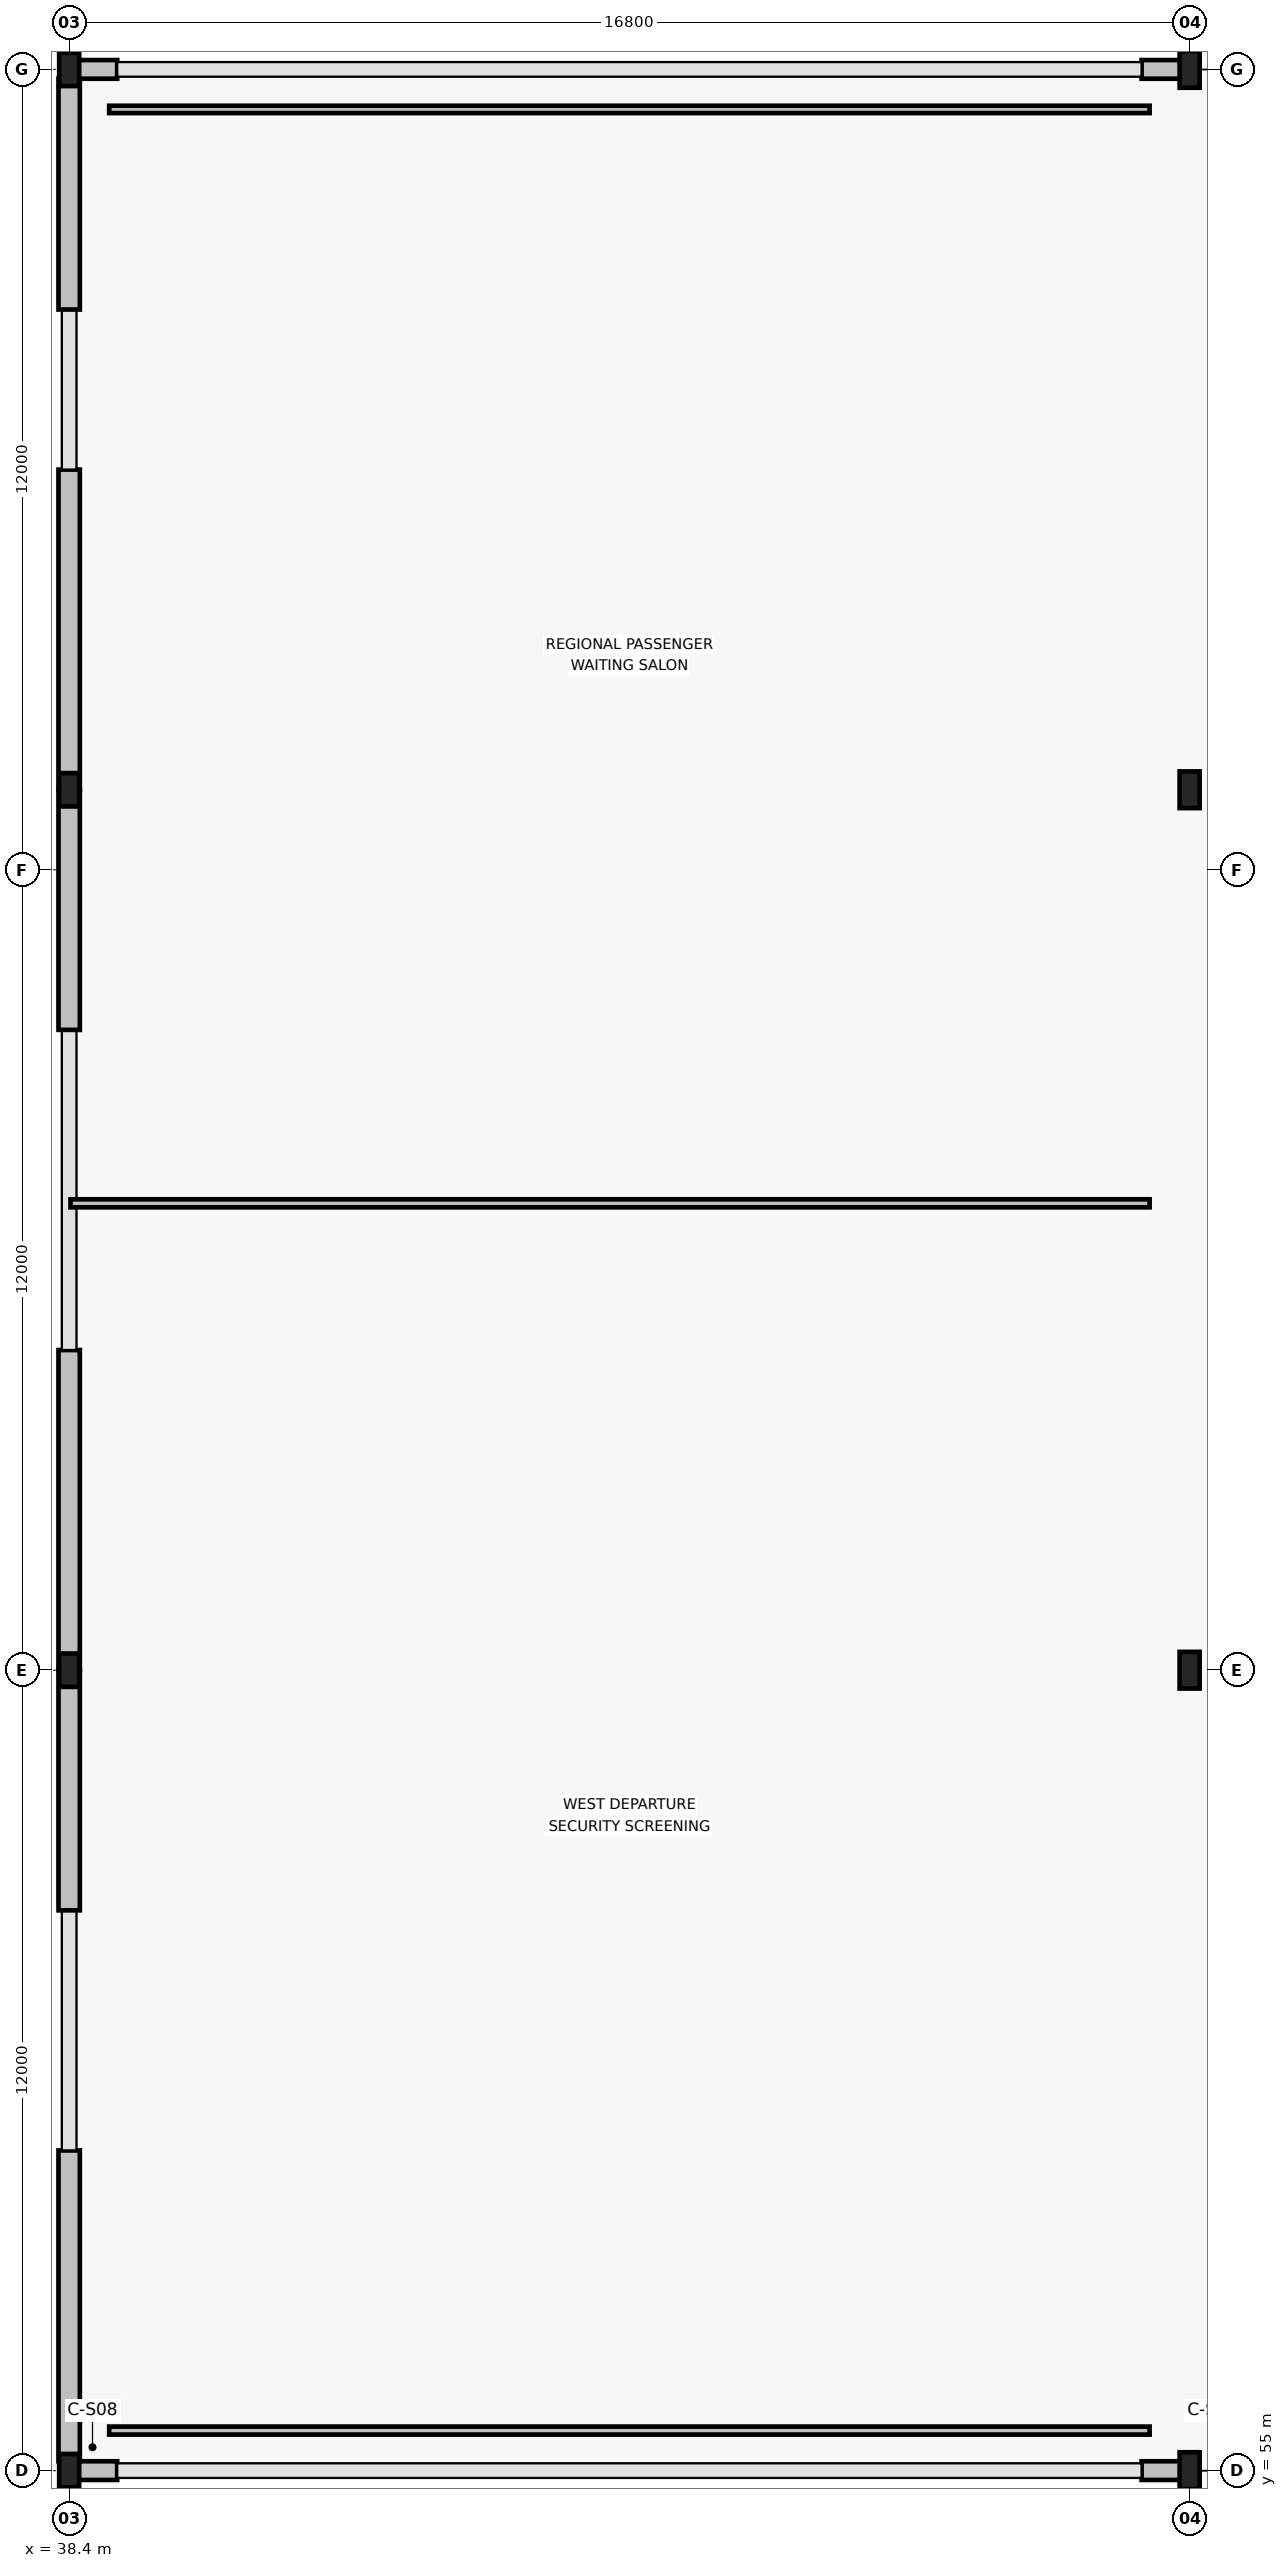
"""IFC4 building model, lengths in metres.
Left out: names, types, materials, properties, quantities, classifications, styles, units other than length and angle.
Written with IfcOpenShell. Run it as: python <this file> out.ifc"""

import sys

from ifc_helpers import new_model, si_unit, direction, frame, frame_2d, origin, origin_2d, place, context, subcontext, project, spatial, rectangle, i_section, extrude, element, save


model = new_model("IFC4")
c1 = context("Model", 3, precision=1e-05, world=origin(), true_north=direction((0.0, 1.0)))
c2 = subcontext(c1, "Body", "Model", "MODEL_VIEW")
j1 = project(units=[si_unit("LENGTHUNIT", "METRE"), si_unit("PLANEANGLEUNIT", "RADIAN")], contexts=[c1])
p1 = place(None, origin())
s1 = spatial("IfcSite", under=j1, at=p1, CompositionType="ELEMENT")
p2 = place(p1, origin())
s2 = spatial("IfcBuilding", under=s1, at=p2, CompositionType="ELEMENT")
p3 = place(p2, frame((0.0, 0.0, 5.4)))
s3 = spatial("IfcBuildingStorey", under=s2, at=p3, CompositionType="ELEMENT", Elevation=5.4)
p4 = place(p3, frame((55.2, 55.0, 0.0), z_axis=(0.0, 0.0, 1.0), x_axis=(1.0, 0.0, 0.0)))
e1 = element("IfcColumn", 1, at=p4, inside=s3, PredefinedType="COLUMN", context=c2, shape_type="SweptSolid", body=[
    extrude(i_section(OverallWidth=0.3, OverallDepth=0.55, WebThickness=0.015, FlangeThickness=0.029, FilletRadius=0.027, at=origin_2d()), origin(), (0.0, 0.0, 1.0), 5.75),
])
for number, where, z_axis, x_axis in (
    (2, (55.2, 67.0, 0.0), (0.0, 0.0, 1.0), (1.0, 0.0, 0.0)),
    (3, (55.2, 80.2, 0.0), (0.0, 0.0, 1.0), (1.0, 0.0, 0.0)),
    (4, (55.2, 91.0, 0.0), (0.0, 0.0, 1.0), (1.0, 0.0, 0.0)),
):
    element("IfcColumn", number, at=place(p3, frame(where, z_axis=z_axis, x_axis=x_axis)), inside=s3, PredefinedType="COLUMN", context=c2, shape_type="SweptSolid", body=[
        extrude(i_section(OverallWidth=0.3, OverallDepth=0.55, WebThickness=0.015, FlangeThickness=0.029, FilletRadius=0.027, at=origin_2d()), origin(), (0.0, 0.0, 1.0), 5.4),
    ])
for number, where, z_axis, x_axis in (
    (5, (38.4, 55.0, 0.0), (0.0, 0.0, 1.0), (1.0, 0.0, 0.0)),
    (6, (38.4, 67.0, 0.0), (0.0, 0.0, 1.0), (1.0, 0.0, 0.0)),
    (7, (38.4, 80.2, 0.0), (0.0, 0.0, 1.0), (1.0, 0.0, 0.0)),
    (8, (38.4, 91.0, 0.0), (0.0, 0.0, 1.0), (1.0, 0.0, 0.0)),
):
    element("IfcColumn", number, at=place(p3, frame(where, z_axis=z_axis, x_axis=x_axis)), inside=s3, PredefinedType="COLUMN", context=c2, shape_type="SweptSolid", body=[
        extrude(i_section(OverallWidth=0.3, OverallDepth=0.5, WebThickness=0.014, FlangeThickness=0.028, FilletRadius=0.027, at=origin_2d()), origin(), (0.0, 0.0, 1.0), 5.4),
    ])
p5 = place(p3, frame((55.2, 54.14, 0.0), z_axis=(0.0, 0.0, 1.0), x_axis=(0.0, 1.0, 0.0)))
e9 = element("IfcWall", 9, at=p5, inside=s3, PredefinedType="STANDARD", context=c2, shape_type="SweptSolid", body=[
    extrude(rectangle(XDim=0.72, YDim=0.28, at=frame_2d((0.36, 0.0))), origin(), (0.0, 0.0, 1.0), 4.125),
])
p6 = place(p3, frame((38.4, 55.0, 0.0), z_axis=(0.0, 0.0, 1.0), x_axis=(1.0, 0.0, 0.0)))
e10 = element("IfcWall", 10, at=p6, inside=s3, PredefinedType="STANDARD", context=c2, shape_type="SweptSolid", body=[
    extrude(rectangle(XDim=0.72, YDim=0.28, at=frame_2d((0.36, 0.0))), origin(), (0.0, 0.0, 1.0), 5.14),
])
p7 = place(p3, frame((54.48, 55.0, 0.0), z_axis=(0.0, 0.0, 1.0), x_axis=(1.0, 0.0, 0.0)))
e11 = element("IfcWall", 11, at=p7, inside=s3, PredefinedType="STANDARD", context=c2, shape_type="SweptSolid", body=[
    extrude(rectangle(XDim=0.72, YDim=0.28, at=frame_2d((0.36, 0.0))), origin(), (0.0, 0.0, 1.0), 5.14),
])
p8 = place(p3, frame((38.4, 91.0, 0.0), z_axis=(0.0, 0.0, 1.0), x_axis=(1.0, 0.0, 0.0)))
e12 = element("IfcWall", 12, at=p8, inside=s3, PredefinedType="STANDARD", context=c2, shape_type="SweptSolid", body=[
    extrude(rectangle(XDim=0.72, YDim=0.28, at=frame_2d((0.36, 0.0))), origin(), (0.0, 0.0, 1.0), 4.485),
])
p9 = place(p3, frame((54.48, 91.0, 0.0), z_axis=(0.0, 0.0, 1.0), x_axis=(1.0, 0.0, 0.0)))
e13 = element("IfcWall", 13, at=p9, inside=s3, PredefinedType="STANDARD", context=c2, shape_type="SweptSolid", body=[
    extrude(rectangle(XDim=0.72, YDim=0.28, at=frame_2d((0.36, 0.0))), origin(), (0.0, 0.0, 1.0), 4.485),
])
p10 = place(p3, frame((38.4, 55.14, 0.0), z_axis=(0.0, 0.0, 1.0), x_axis=(0.0, 1.0, 0.0)))
e14 = element("IfcWall", 14, at=p10, inside=s3, PredefinedType="STANDARD", context=c2, shape_type="SweptSolid", body=[
    extrude(rectangle(XDim=4.66, YDim=0.32, at=frame_2d((2.33, 0.0))), origin(), (0.0, 0.0, 1.0), 4.125),
])
p11 = place(p3, frame((38.4, 63.4, 0.0), z_axis=(0.0, 0.0, 1.0), x_axis=(0.0, 1.0, 0.0)))
e15 = element("IfcWall", 15, at=p11, inside=s3, PredefinedType="STANDARD", context=c2, shape_type="SweptSolid", body=[
    extrude(rectangle(XDim=3.6, YDim=0.32, at=frame_2d((1.8, 0.0))), origin(), (0.0, 0.0, 1.0), 4.125),
])
p12 = place(p3, frame((38.4, 67.0, 0.0), z_axis=(0.0, 0.0, 1.0), x_axis=(0.0, 1.0, 0.0)))
e16 = element("IfcWall", 16, at=p12, inside=s3, PredefinedType="STANDARD", context=c2, shape_type="SweptSolid", body=[
    extrude(rectangle(XDim=4.8, YDim=0.32, at=frame_2d((2.4, 0.0))), origin(), (0.0, 0.0, 1.0), 4.125),
])
p13 = place(p3, frame((38.4, 76.6, 0.0), z_axis=(0.0, 0.0, 1.0), x_axis=(0.0, 1.0, 0.0)))
e17 = element("IfcWall", 17, at=p13, inside=s3, PredefinedType="STANDARD", context=c2, shape_type="SweptSolid", body=[
    extrude(rectangle(XDim=3.6, YDim=0.32, at=frame_2d((1.8, 0.0))), origin(), (0.0, 0.0, 1.0), 4.125),
])
p14 = place(p3, frame((38.4, 80.2, 0.0), z_axis=(0.0, 0.0, 1.0), x_axis=(0.0, 1.0, 0.0)))
e18 = element("IfcWall", 18, at=p14, inside=s3, PredefinedType="STANDARD", context=c2, shape_type="SweptSolid", body=[
    extrude(rectangle(XDim=4.8, YDim=0.32, at=frame_2d((2.4, 0.0))), origin(), (0.0, 0.0, 1.0), 4.125),
])
p15 = place(p3, frame((38.4, 87.4, 0.0), z_axis=(0.0, 0.0, 1.0), x_axis=(0.0, 1.0, 0.0)))
e19 = element("IfcWall", 19, at=p15, inside=s3, PredefinedType="STANDARD", context=c2, shape_type="SweptSolid", body=[
    extrude(rectangle(XDim=3.46, YDim=0.32, at=frame_2d((1.73, 0.0))), origin(), (0.0, 0.0, 1.0), 4.125),
])
p16 = place(p3, frame((55.2, 91.14, 0.0), z_axis=(0.0, 0.0, 1.0), x_axis=(0.0, 1.0, 0.0)))
e20 = element("IfcWall", 20, at=p16, inside=s3, PredefinedType="STANDARD", context=c2, shape_type="SweptSolid", body=[
    extrude(rectangle(XDim=5.66, YDim=0.28, at=frame_2d((2.83, 0.0))), origin(), (0.0, 0.0, 1.0), 4.125),
])
p17 = place(p3, frame((39.0, 55.6, 0.0), z_axis=(0.0, 0.0, 1.0), x_axis=(1.0, 0.0, 0.0)))
e21 = element("IfcWall", 21, at=p17, inside=s3, PredefinedType="PARTITIONING", context=c2, shape_type="SweptSolid", body=[
    extrude(rectangle(XDim=15.6, YDim=0.12, at=frame_2d((7.8, 0.0))), origin(), (0.0, 0.0, 1.0), 4.485),
])
p18 = place(p3, frame((54.6, 74.0, 0.0), z_axis=(0.0, 0.0, 1.0), x_axis=(-1.0, 0.0, 0.0)))
e22 = element("IfcWall", 22, at=p18, inside=s3, PredefinedType="PARTITIONING", context=c2, shape_type="SweptSolid", body=[
    extrude(rectangle(XDim=16.18, YDim=0.12, at=frame_2d((8.09, 0.0))), origin(), (0.0, 0.0, 1.0), 5.16),
])
p19 = place(p3, frame((54.6, 90.4, 0.0), z_axis=(0.0, 0.0, 1.0), x_axis=(-1.0, 0.0, 0.0)))
e23 = element("IfcWall", 23, at=p19, inside=s3, PredefinedType="MOVABLE", context=c2, shape_type="SweptSolid", body=[
    extrude(rectangle(XDim=15.6, YDim=0.11, at=frame_2d((7.8, 0.0))), origin(), (0.0, 0.0, 1.0), 5.16),
])
save(model, sys.argv[1])
